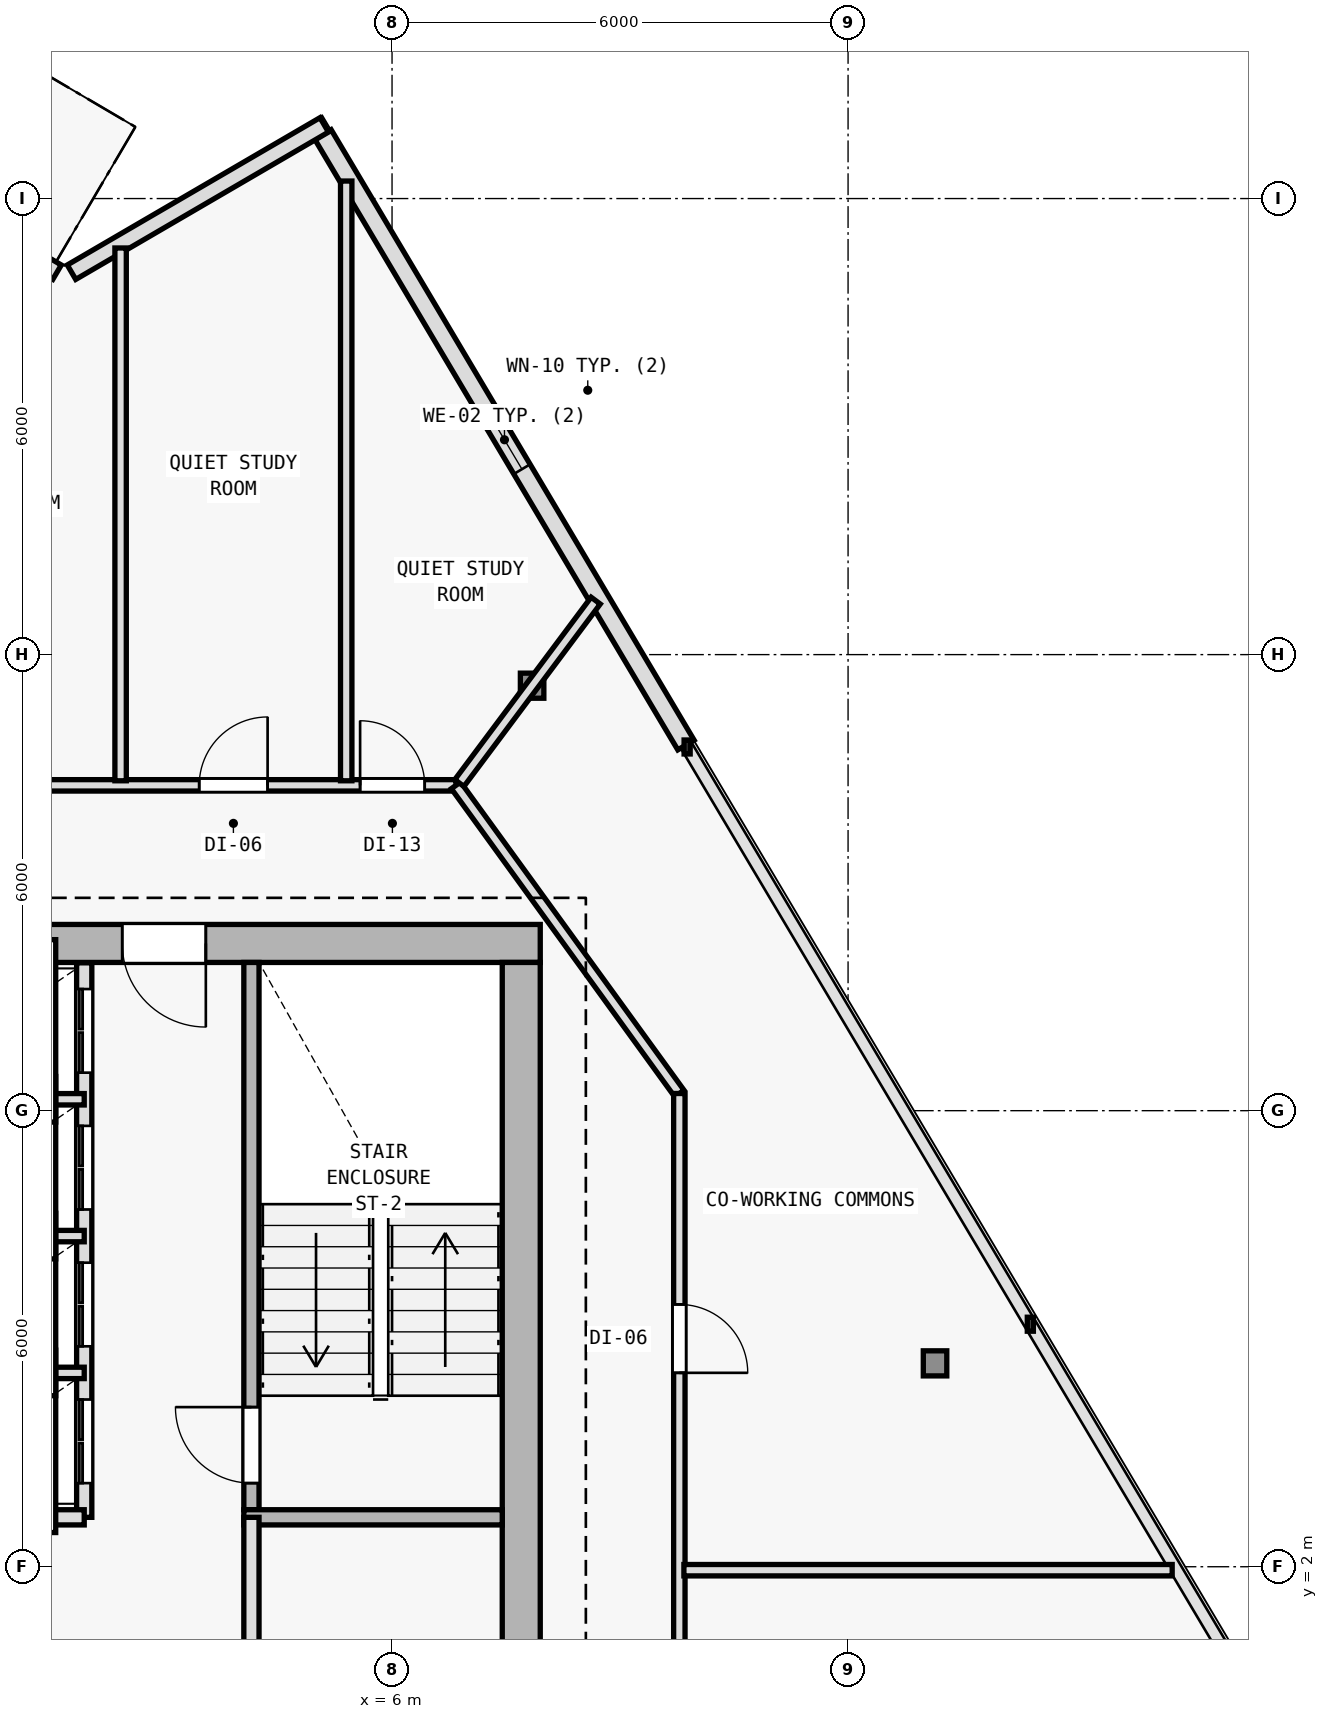
"""IFC4 building model, lengths in metres.
Left out: names, types, materials, properties, quantities, classifications, styles, units other than length and angle.
Written with IfcOpenShell. Run it as: python <this file> out.ifc"""

import sys

from ifc_helpers import new_model, si_unit, direction, frame, frame_2d, origin, origin_2d, place, context, subcontext, project, spatial, rectangle, i_section, extrude, element, fill, save


model = new_model("IFC4")
c1 = context("Model", 3, precision=1e-05, world=origin(), true_north=direction((0.0, 1.0)))
c2 = subcontext(c1, "Body", "Model", "MODEL_VIEW")
j1 = project(units=[si_unit("LENGTHUNIT", "METRE"), si_unit("PLANEANGLEUNIT", "RADIAN")], contexts=[c1])
p1 = place(None, origin())
s1 = spatial("IfcSite", under=j1, at=p1, CompositionType="ELEMENT")
p2 = place(p1, origin())
s2 = spatial("IfcBuilding", under=s1, at=p2, CompositionType="ELEMENT")
p3 = place(p2, frame((0.0, 0.0, 294.0)))
s3 = spatial("IfcBuildingStorey", under=s2, at=p3, CompositionType="ELEMENT", Elevation=294.0)
p4 = place(p3, frame((7.7, 10.2, 0.0), z_axis=(0.0, 0.0, 1.0), x_axis=(1.0, 0.0, 0.0)))
e1 = element("IfcColumn", 1, at=p4, inside=s3, PredefinedType="COLUMN", context=c2, shape_type="SweptSolid", body=[
    extrude(i_section(OverallWidth=0.374, OverallDepth=0.372, WebThickness=0.012, FlangeThickness=0.02, FilletRadius=0.015, at=origin_2d()), origin(), (0.0, 0.0, 1.0), 3.6),
])
for number, where, z_axis, x_axis in (
    (2, (13.144, 4.676, 0.006), (0.0, 0.0, 1.0), (1.0, 0.0, 0.0)),
    (3, (7.843, 13.591, 0.006), (0.0, 0.0, 1.0), (1.0, 0.0, 0.0)),
):
    element("IfcColumn", number, at=place(p3, frame(where, z_axis=z_axis, x_axis=x_axis)), inside=s3, PredefinedType="COLUMN", context=c2, shape_type="SweptSolid", body=[
        extrude(i_section(OverallWidth=0.309, OverallDepth=0.33, WebThickness=0.011, FlangeThickness=0.019, FilletRadius=0.027, at=origin_2d()), origin(), (0.0, 0.0, 1.0), 3.594),
    ])
p5 = place(p3, frame((5.091, 20.842, 0.0), z_axis=(0.0, 0.0, 1.0), x_axis=(0.511095217069, -0.859524100354, 0.0)))
e4 = element("IfcWall", 4, at=p5, inside=s3, PredefinedType="SOLIDWALL", context=c2, shape_type="SweptSolid", body=[
    extrude(rectangle(XDim=9.344, YDim=0.25, at=frame_2d((4.672, 0.0))), origin(), (0.0, 0.0, 1.0), 3.34),
])
p6 = place(p5, frame((4.222, 0.0, 0.62)))
e5 = element("IfcOpeningElement", 5, at=p6, cuts=e4, PredefinedType="OPENING", context=c2, shape_type="SweptSolid", body=[
    extrude(rectangle(XDim=0.9, YDim=1.6, at=frame_2d((0.45, 0.8))), frame((0.0, 0.135, 0.0), z_axis=(0.0, -1.0, 0.0), x_axis=(1.0, 0.0, 0.0)), (0.0, 0.0, 1.0), 0.27),
])
p7 = place(p3, frame((1.783, 19.031, 0.0), z_axis=(0.0, 0.0, 1.0), x_axis=(0.863972097652, 0.503539685108, 0.0)))
e6 = element("IfcWall", 6, at=p7, inside=s3, PredefinedType="SOLIDWALL", context=c2, shape_type="SweptSolid", body=[
    extrude(rectangle(XDim=3.849, YDim=0.22, at=frame_2d((1.924, 0.0))), origin(), (0.0, 0.0, 1.0), 3.34),
])
p8 = place(p3, frame((-2.074, 21.186, 0.0), z_axis=(0.0, 0.0, 1.0), x_axis=(0.862137800155, -0.506673872964, 0.0)))
e7 = element("IfcWall", 7, at=p8, inside=s3, PredefinedType="SOLIDWALL", context=c2, shape_type="SweptSolid", body=[
    extrude(rectangle(XDim=4.253, YDim=0.22, at=frame_2d((2.126, 0.0))), origin(), (0.0, 0.0, 1.0), 3.34),
])
p9 = place(p8, frame((2.451, 0.0, 0.0)))
e8 = element("IfcOpeningElement", 8, at=p9, cuts=e7, PredefinedType="OPENING", context=c2, shape_type="SweptSolid", body=[
    extrude(rectangle(XDim=1.05, YDim=2.15, at=frame_2d((0.525, 1.075))), frame((0.0, 0.12, 0.0), z_axis=(0.0, -1.0, 0.0), x_axis=(1.0, 0.0, 0.0)), (0.0, 0.0, 1.0), 0.24),
])
p10 = place(p3, frame((7.95, 10.2, 0.0), z_axis=(0.0, 0.0, 1.0), x_axis=(-1.0, 0.0, 0.0)))
e9 = element("IfcWall", 9, at=p10, inside=s3, PredefinedType="SHEAR", context=c2, shape_type="SweptSolid", body=[
    extrude(rectangle(XDim=15.9, YDim=0.5, at=frame_2d((7.95, 0.0))), origin(), (0.0, 0.0, 1.0), 3.34),
])
p11 = place(p10, frame((4.4, 0.0, 0.0)))
e10 = element("IfcOpeningElement", 10, at=p11, cuts=e9, PredefinedType="OPENING", context=c2, shape_type="SweptSolid", body=[
    extrude(rectangle(XDim=1.1, YDim=2.15, at=frame_2d((0.55, 1.075))), frame((0.0, 0.26, 0.0), z_axis=(0.0, -1.0, 0.0), x_axis=(1.0, 0.0, 0.0)), (0.0, 0.0, 1.0), 0.52),
])
p12 = place(p3, frame((7.7, 9.95, 0.0), z_axis=(0.0, 0.0, 1.0), x_axis=(0.0, -1.0, 0.0)))
e11 = element("IfcWall", 11, at=p12, inside=s3, PredefinedType="SHEAR", context=c2, shape_type="SweptSolid", body=[
    extrude(rectangle(XDim=19.1, YDim=0.5, at=frame_2d((9.55, 0.0))), origin(), (0.0, 0.0, 1.0), 3.34),
])
p13 = place(p3, frame((4.15, 2.75, 0.0), z_axis=(0.0, 0.0, 1.0), x_axis=(0.0, 1.0, 0.0)))
e12 = element("IfcWall", 12, at=p13, inside=s3, PredefinedType="SOLIDWALL", context=c2, shape_type="SweptSolid", body=[
    extrude(rectangle(XDim=7.2, YDim=0.2, at=frame_2d((3.6, 0.0))), origin(), (0.0, 0.0, 1.0), 3.34),
])
p14 = place(p13, frame((0.35, 0.0, 0.0)))
e13 = element("IfcOpeningElement", 13, at=p14, cuts=e12, PredefinedType="OPENING", context=c2, shape_type="SweptSolid", body=[
    extrude(rectangle(XDim=1.0, YDim=2.15, at=frame_2d((0.5, 1.075))), frame((0.0, 0.11, 0.0), z_axis=(0.0, -1.0, 0.0), x_axis=(1.0, 0.0, 0.0)), (0.0, 0.0, 1.0), 0.22),
])
p15 = place(p3, frame((4.05, 2.65, 0.0), z_axis=(0.0, 0.0, 1.0), x_axis=(1.0, 0.0, 0.0)))
e14 = element("IfcWall", 14, at=p15, inside=s3, PredefinedType="SOLIDWALL", context=c2, shape_type="SweptSolid", body=[
    extrude(rectangle(XDim=3.4, YDim=0.2, at=frame_2d((1.7, 0.0))), origin(), (0.0, 0.0, 1.0), 3.34),
])
p16 = place(p3, frame((4.15, -6.05, 0.0), z_axis=(0.0, 0.0, 1.0), x_axis=(0.0, 1.0, 0.0)))
e15 = element("IfcWall", 15, at=p16, inside=s3, PredefinedType="SOLIDWALL", context=c2, shape_type="SweptSolid", body=[
    extrude(rectangle(XDim=8.7, YDim=0.2, at=frame_2d((4.35, 0.0))), origin(), (0.0, 0.0, 1.0), 3.34),
])
p17 = place(p16, frame((3.6, 0.0, 0.0)))
e16 = element("IfcOpeningElement", 16, at=p17, cuts=e15, PredefinedType="OPENING", context=c2, shape_type="SweptSolid", body=[
    extrude(rectangle(XDim=0.95, YDim=2.1, at=frame_2d((0.475, 1.05))), frame((0.0, 0.11, 0.0), z_axis=(0.0, -1.0, 0.0), x_axis=(1.0, 0.0, 0.0)), (0.0, 0.0, 1.0), 0.22),
])
p18 = place(p3, frame((1.95, 2.65, 0.0), z_axis=(0.0, 0.0, 1.0), x_axis=(0.0, 1.0, 0.0)))
e17 = element("IfcWall", 17, at=p18, inside=s3, PredefinedType="SOLIDWALL", context=c2, shape_type="SweptSolid", body=[
    extrude(rectangle(XDim=7.295, YDim=0.2, at=frame_2d((3.647, 0.0))), origin(), (0.0, 0.0, 1.0), 3.34),
])
p19 = place(p18, frame((0.45, 0.0, 0.0)))
e18 = element("IfcOpeningElement", 18, at=p19, cuts=e17, PredefinedType="OPENING", context=c2, shape_type="SweptSolid", body=[
    extrude(rectangle(XDim=1.1, YDim=2.15, at=frame_2d((0.55, 1.075))), frame((0.0, 0.11, 0.0), z_axis=(0.0, -1.0, 0.0), x_axis=(1.0, 0.0, 0.0)), (0.0, 0.0, 1.0), 0.22),
])
p20 = place(p18, frame((2.25, 0.0, 0.0)))
e19 = element("IfcOpeningElement", 19, at=p20, cuts=e17, PredefinedType="OPENING", context=c2, shape_type="SweptSolid", body=[
    extrude(rectangle(XDim=1.1, YDim=2.15, at=frame_2d((0.55, 1.075))), frame((0.0, 0.11, 0.0), z_axis=(0.0, -1.0, 0.0), x_axis=(1.0, 0.0, 0.0)), (0.0, 0.0, 1.0), 0.22),
])
p21 = place(p18, frame((4.05, 0.0, 0.0)))
e20 = element("IfcOpeningElement", 20, at=p21, cuts=e17, PredefinedType="OPENING", context=c2, shape_type="SweptSolid", body=[
    extrude(rectangle(XDim=1.1, YDim=2.15, at=frame_2d((0.55, 1.075))), frame((0.0, 0.11, 0.0), z_axis=(0.0, -1.0, 0.0), x_axis=(1.0, 0.0, 0.0)), (0.0, 0.0, 1.0), 0.22),
])
p22 = place(p18, frame((5.85, 0.0, 0.0)))
e21 = element("IfcOpeningElement", 21, at=p22, cuts=e17, PredefinedType="OPENING", context=c2, shape_type="SweptSolid", body=[
    extrude(rectangle(XDim=1.1, YDim=2.15, at=frame_2d((0.55, 1.075))), frame((0.0, 0.11, 0.0), z_axis=(0.0, -1.0, 0.0), x_axis=(1.0, 0.0, 0.0)), (0.0, 0.0, 1.0), 0.22),
])
p23 = place(p3, frame((-0.95, 2.65, 0.0), z_axis=(0.0, 0.0, 1.0), x_axis=(1.0, 0.0, 0.0)))
e22 = element("IfcWall", 22, at=p23, inside=s3, PredefinedType="SOLIDWALL", context=c2, shape_type="SweptSolid", body=[
    extrude(rectangle(XDim=2.9, YDim=0.2, at=frame_2d((1.45, 0.0))), origin(), (0.0, 0.0, 1.0), 3.34),
])
for number, where, z_axis, x_axis in (
    (23, (-0.75, 4.55, 0.0), (0.0, 0.0, 1.0), (1.0, 0.0, 0.0)),
    (24, (-0.75, 6.35, 0.0), (0.0, 0.0, 1.0), (1.0, 0.0, 0.0)),
    (25, (-0.75, 8.15, 0.0), (0.0, 0.0, 1.0), (1.0, 0.0, 0.0)),
):
    element("IfcWall", number, at=place(p3, frame(where, z_axis=z_axis, x_axis=x_axis)), inside=s3, PredefinedType="PARTITIONING", context=c2, shape_type="SweptSolid", body=[
        extrude(rectangle(XDim=2.7, YDim=0.15, at=frame_2d((1.35, 0.0))), origin(), (0.0, 0.0, 1.0), 3.34),
    ])
p24 = place(p3, frame((-6.841, 12.28, 0.0), z_axis=(0.0, 0.0, 1.0), x_axis=(1.0, 0.0, 0.0)))
e26 = element("IfcWall", 26, at=p24, inside=s3, PredefinedType="PARTITIONING", context=c2, shape_type="SweptSolid", body=[
    extrude(rectangle(XDim=13.682, YDim=0.15, at=frame_2d((6.841, 0.0))), origin(), (0.0, 0.0, 1.0), 3.005),
])
p25 = place(p24, frame((12.421, 0.0, 0.0)))
e27 = element("IfcOpeningElement", 27, at=p25, cuts=e26, PredefinedType="OPENING", context=c2, shape_type="SweptSolid", body=[
    extrude(rectangle(XDim=0.85, YDim=2.1, at=frame_2d((0.425, 1.05))), frame((0.0, 0.085, 0.0), z_axis=(0.0, -1.0, 0.0), x_axis=(1.0, 0.0, 0.0)), (0.0, 0.0, 1.0), 0.17),
])
p26 = place(p24, frame((10.304, 0.0, 0.0)))
e28 = element("IfcOpeningElement", 28, at=p26, cuts=e26, PredefinedType="OPENING", context=c2, shape_type="SweptSolid", body=[
    extrude(rectangle(XDim=0.9, YDim=2.1, at=frame_2d((0.45, 1.05))), frame((0.0, 0.085, 0.0), z_axis=(0.0, -1.0, 0.0), x_axis=(1.0, 0.0, 0.0)), (0.0, 0.0, 1.0), 0.17),
])
p27 = place(p24, frame((6.797, 0.0, 0.0)))
e29 = element("IfcOpeningElement", 29, at=p27, cuts=e26, PredefinedType="OPENING", context=c2, shape_type="SweptSolid", body=[
    extrude(rectangle(XDim=0.9, YDim=2.1, at=frame_2d((0.45, 1.05))), frame((0.0, 0.085, 0.0), z_axis=(0.0, -1.0, 0.0), x_axis=(1.0, 0.0, 0.0)), (0.0, 0.0, 1.0), 0.17),
])
p28 = place(p24, frame((2.727, 0.0, 0.0)))
e30 = element("IfcOpeningElement", 30, at=p28, cuts=e26, PredefinedType="OPENING", context=c2, shape_type="SweptSolid", body=[
    extrude(rectangle(XDim=0.9, YDim=2.1, at=frame_2d((0.45, 1.05))), frame((0.0, 0.085, 0.0), z_axis=(0.0, -1.0, 0.0), x_axis=(1.0, 0.0, 0.0)), (0.0, 0.0, 1.0), 0.17),
])
p29 = place(p3, frame((6.841, 12.28, 0.0), z_axis=(0.0, 0.0, 1.0), x_axis=(0.586956386413, -0.809618552436, 0.0)))
e31 = element("IfcWall", 31, at=p29, inside=s3, PredefinedType="PARTITIONING", context=c2, shape_type="SweptSolid", body=[
    extrude(rectangle(XDim=5.008, YDim=0.15, at=frame_2d((2.504, 0.0))), origin(), (0.0, 0.0, 1.0), 2.915),
])
p30 = place(p3, frame((9.78, 8.226, 0.0), z_axis=(0.0, 0.0, 1.0), x_axis=(0.0, -1.0, 0.0)))
e32 = element("IfcWall", 32, at=p30, inside=s3, PredefinedType="PARTITIONING", context=c2, shape_type="SweptSolid", body=[
    extrude(rectangle(XDim=19.706, YDim=0.15, at=frame_2d((9.853, 0.0))), origin(), (0.0, 0.0, 1.0), 2.765),
])
p31 = place(p30, frame((15.547, 0.0, 0.0)))
e33 = element("IfcOpeningElement", 33, at=p31, cuts=e32, PredefinedType="OPENING", context=c2, shape_type="SweptSolid", body=[
    extrude(rectangle(XDim=0.9, YDim=2.1, at=frame_2d((0.45, 1.05))), frame((0.0, 0.085, 0.0), z_axis=(0.0, -1.0, 0.0), x_axis=(1.0, 0.0, 0.0)), (0.0, 0.0, 1.0), 0.17),
])
p32 = place(p30, frame((8.919, 0.0, 0.0)))
e34 = element("IfcOpeningElement", 34, at=p32, cuts=e32, PredefinedType="OPENING", context=c2, shape_type="SweptSolid", body=[
    extrude(rectangle(XDim=0.9, YDim=2.1, at=frame_2d((0.45, 1.05))), frame((0.0, 0.085, 0.0), z_axis=(0.0, -1.0, 0.0), x_axis=(1.0, 0.0, 0.0)), (0.0, 0.0, 1.0), 0.17),
])
p33 = place(p30, frame((2.775, 0.0, 0.0)))
e35 = element("IfcOpeningElement", 35, at=p33, cuts=e32, PredefinedType="OPENING", context=c2, shape_type="SweptSolid", body=[
    extrude(rectangle(XDim=0.9, YDim=2.1, at=frame_2d((0.45, 1.05))), frame((0.0, 0.085, 0.0), z_axis=(0.0, -1.0, 0.0), x_axis=(1.0, 0.0, 0.0)), (0.0, 0.0, 1.0), 0.17),
])
p34 = place(p3, frame((6.886, 12.31, 0.0), z_axis=(0.0, 0.0, 1.0), x_axis=(0.598669337962, 0.80099626952, 0.0)))
e36 = element("IfcWall", 36, at=p34, inside=s3, PredefinedType="PARTITIONING", context=c2, shape_type="SweptSolid", body=[
    extrude(rectangle(XDim=2.996, YDim=0.15, at=frame_2d((1.498, 0.0))), origin(), (0.0, 0.0, 1.0), 3.005),
])
p35 = place(p3, frame((2.429, 12.34, 0.0), z_axis=(0.0, 0.0, 1.0), x_axis=(0.0, 1.0, 0.0)))
e37 = element("IfcWall", 37, at=p35, inside=s3, PredefinedType="PARTITIONING", context=c2, shape_type="SweptSolid", body=[
    extrude(rectangle(XDim=7.01, YDim=0.15, at=frame_2d((3.505, 0.0))), origin(), (0.0, 0.0, 1.0), 3.005),
])
p36 = place(p3, frame((9.84, 1.954, 0.0), z_axis=(0.0, 0.0, 1.0), x_axis=(1.0, 0.0, 0.0)))
e38 = element("IfcWall", 38, at=p36, inside=s3, PredefinedType="PARTITIONING", context=c2, shape_type="SweptSolid", body=[
    extrude(rectangle(XDim=6.424, YDim=0.15, at=frame_2d((3.212, 0.0))), origin(), (0.0, 0.0, 1.0), 2.865),
])
p37 = place(p3, frame((5.397, 12.34, 0.0), z_axis=(0.0, 0.0, 1.0), x_axis=(0.0, 1.0, 0.0)))
e39 = element("IfcWall", 39, at=p37, inside=s3, PredefinedType="PARTITIONING", context=c2, shape_type="SweptSolid", body=[
    extrude(rectangle(XDim=7.89, YDim=0.15, at=frame_2d((3.945, 0.0))), origin(), (0.0, 0.0, 1.0), 3.005),
])
p38 = place(p6, origin())
e40 = element("IfcWindow", 40, at=p38, inside=s3, PartitioningType="SINGLE_PANEL", PredefinedType="WINDOW", context=c2, shape_type="SweptSolid", body=[
    extrude(rectangle(XDim=0.9, YDim=1.6, at=frame_2d((0.45, 0.8))), frame((0.0, 0.03, 0.0), z_axis=(0.0, -1.0, 0.0), x_axis=(1.0, 0.0, 0.0)), (0.0, 0.0, 1.0), 0.06),
])
fill(e5, e40)
p39 = place(p11, origin())
e41 = element("IfcDoor", 41, at=p39, inside=s3, OperationType="SINGLE_SWING_LEFT", PredefinedType="DOOR", context=c2, shape_type="SweptSolid", body=[
    extrude(rectangle(XDim=1.1, YDim=2.15, at=frame_2d((0.55, 1.075))), frame((0.0, 0.025, 0.0), z_axis=(0.0, -1.0, 0.0), x_axis=(1.0, 0.0, 0.0)), (0.0, 0.0, 1.0), 0.05),
])
fill(e10, e41)
p40 = place(p14, origin())
e42 = element("IfcDoor", 42, at=p40, inside=s3, OperationType="SINGLE_SWING_RIGHT", PredefinedType="DOOR", context=c2, shape_type="SweptSolid", body=[
    extrude(rectangle(XDim=1.0, YDim=2.15, at=frame_2d((0.5, 1.075))), frame((0.0, 0.025, 0.0), z_axis=(0.0, -1.0, 0.0), x_axis=(1.0, 0.0, 0.0)), (0.0, 0.0, 1.0), 0.05),
])
fill(e13, e42)
p41 = place(p19, origin())
e43 = element("IfcDoor", 43, at=p41, inside=s3, OperationType="DOUBLE_DOOR_SLIDING", PredefinedType="DOOR", context=c2, shape_type="SweptSolid", body=[
    extrude(rectangle(XDim=1.1, YDim=2.15, at=frame_2d((0.55, 1.075))), frame((0.0, 0.025, 0.0), z_axis=(0.0, -1.0, 0.0), x_axis=(1.0, 0.0, 0.0)), (0.0, 0.0, 1.0), 0.05),
])
fill(e18, e43)
p42 = place(p20, origin())
e44 = element("IfcDoor", 44, at=p42, inside=s3, OperationType="DOUBLE_DOOR_SLIDING", PredefinedType="DOOR", context=c2, shape_type="SweptSolid", body=[
    extrude(rectangle(XDim=1.1, YDim=2.15, at=frame_2d((0.55, 1.075))), frame((0.0, 0.025, 0.0), z_axis=(0.0, -1.0, 0.0), x_axis=(1.0, 0.0, 0.0)), (0.0, 0.0, 1.0), 0.05),
])
fill(e19, e44)
p43 = place(p21, origin())
e45 = element("IfcDoor", 45, at=p43, inside=s3, OperationType="DOUBLE_DOOR_SLIDING", PredefinedType="DOOR", context=c2, shape_type="SweptSolid", body=[
    extrude(rectangle(XDim=1.1, YDim=2.15, at=frame_2d((0.55, 1.075))), frame((0.0, 0.025, 0.0), z_axis=(0.0, -1.0, 0.0), x_axis=(1.0, 0.0, 0.0)), (0.0, 0.0, 1.0), 0.05),
])
fill(e20, e45)
p44 = place(p22, origin())
e46 = element("IfcDoor", 46, at=p44, inside=s3, OperationType="DOUBLE_DOOR_SLIDING", PredefinedType="DOOR", context=c2, shape_type="SweptSolid", body=[
    extrude(rectangle(XDim=1.1, YDim=2.15, at=frame_2d((0.55, 1.075))), frame((0.0, 0.025, 0.0), z_axis=(0.0, -1.0, 0.0), x_axis=(1.0, 0.0, 0.0)), (0.0, 0.0, 1.0), 0.05),
])
fill(e21, e46)
p45 = place(p33, origin())
e47 = element("IfcDoor", 47, at=p45, inside=s3, OperationType="SINGLE_SWING_RIGHT", PredefinedType="DOOR", context=c2, shape_type="SweptSolid", body=[
    extrude(rectangle(XDim=0.9, YDim=2.1, at=frame_2d((0.45, 1.05))), frame((0.0, 0.025, 0.0), z_axis=(0.0, -1.0, 0.0), x_axis=(1.0, 0.0, 0.0)), (0.0, 0.0, 1.0), 0.05),
])
fill(e35, e47)
p46 = place(p25, origin())
e48 = element("IfcDoor", 48, at=p46, inside=s3, OperationType="SINGLE_SWING_LEFT", PredefinedType="DOOR", context=c2, shape_type="SweptSolid", body=[
    extrude(rectangle(XDim=0.85, YDim=2.1, at=frame_2d((0.425, 1.05))), frame((0.0, 0.025, 0.0), z_axis=(0.0, -1.0, 0.0), x_axis=(1.0, 0.0, 0.0)), (0.0, 0.0, 1.0), 0.05),
])
fill(e27, e48)
p47 = place(p26, origin())
e49 = element("IfcDoor", 49, at=p47, inside=s3, OperationType="SINGLE_SWING_RIGHT", PredefinedType="DOOR", context=c2, shape_type="SweptSolid", body=[
    extrude(rectangle(XDim=0.9, YDim=2.1, at=frame_2d((0.45, 1.05))), frame((0.0, 0.025, 0.0), z_axis=(0.0, -1.0, 0.0), x_axis=(1.0, 0.0, 0.0)), (0.0, 0.0, 1.0), 0.05),
])
fill(e28, e49)
save(model, sys.argv[1])
